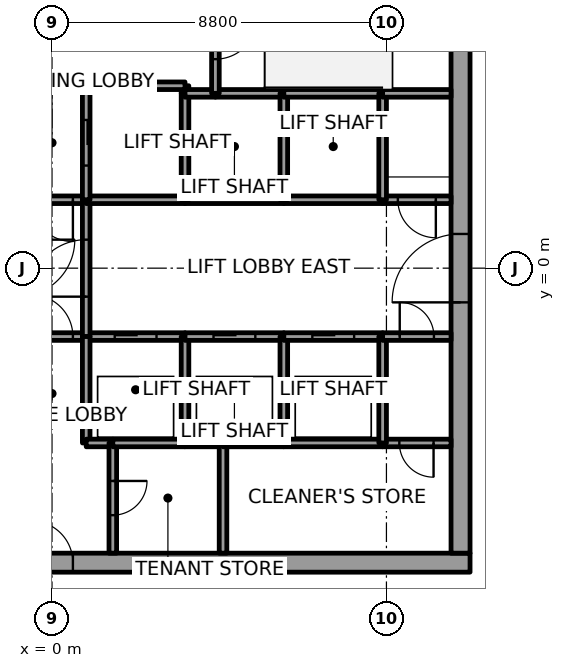
"""IFC4 building model, lengths in metres.
Left out: names, types, materials, properties, quantities, classifications, styles, units other than length and angle.
Written with IfcOpenShell. Run it as: python <this file> out.ifc"""

import sys

from ifc_helpers import new_model, si_unit, direction, frame, frame_2d, origin, place, context, subcontext, project, spatial, rectangle, extrude, element, fill, save


model = new_model("IFC4")
c1 = context("Model", 3, precision=1e-05, world=origin(), true_north=direction((0.0, 1.0)))
c2 = subcontext(c1, "Body", "Model", "MODEL_VIEW")
j1 = project(units=[si_unit("LENGTHUNIT", "METRE"), si_unit("PLANEANGLEUNIT", "RADIAN")], contexts=[c1])
p1 = place(None, origin())
s1 = spatial("IfcSite", under=j1, at=p1, CompositionType="ELEMENT")
p2 = place(p1, origin())
s2 = spatial("IfcBuilding", under=s1, at=p2, CompositionType="ELEMENT")
p3 = place(p2, frame((0.0, 0.0, 197.8)))
s3 = spatial("IfcBuildingStorey", under=s2, at=p3, CompositionType="ELEMENT", Elevation=197.8)
p4 = place(p3, frame((-11.0, -7.75, 0.0), z_axis=(0.0, 0.0, 1.0), x_axis=(1.0, 0.0, 0.0)))
e1 = element("IfcWall", 1, at=p4, inside=s3, PredefinedType="SHEAR", context=c2, shape_type="SweptSolid", body=[
    extrude(rectangle(XDim=22.0, YDim=0.5, at=frame_2d((11.0, 0.0))), origin(), (0.0, 0.0, 1.0), 4.0),
])
p5 = place(p4, frame((10.45, 0.0, 0.0)))
e2 = element("IfcOpeningElement", 2, at=p5, cuts=e1, PredefinedType="OPENING", context=c2, shape_type="SweptSolid", body=[
    extrude(rectangle(XDim=1.1, YDim=2.1, at=frame_2d((0.55, 1.05))), frame((0.0, 0.25, 0.0), z_axis=(0.0, -1.0, 0.0), x_axis=(1.0, 0.0, 0.0)), (0.0, 0.0, 1.0), 0.5),
])
p6 = place(p3, frame((10.75, -7.5, 0.0), z_axis=(0.0, 0.0, 1.0), x_axis=(0.0, 1.0, 0.0)))
e3 = element("IfcWall", 3, at=p6, inside=s3, PredefinedType="SHEAR", context=c2, shape_type="SweptSolid", body=[
    extrude(rectangle(XDim=15.0, YDim=0.5, at=frame_2d((7.5, 0.0))), origin(), (0.0, 0.0, 1.0), 4.0),
])
p7 = place(p6, frame((6.6, 0.0, 0.0)))
e4 = element("IfcOpeningElement", 4, at=p7, cuts=e3, PredefinedType="OPENING", context=c2, shape_type="SweptSolid", body=[
    extrude(rectangle(XDim=1.8, YDim=2.1, at=frame_2d((0.9, 1.05))), frame((0.0, 0.25, 0.0), z_axis=(0.0, -1.0, 0.0), x_axis=(1.0, 0.0, 0.0)), (0.0, 0.0, 1.0), 0.5),
])
p8 = place(p3, frame((-0.9, -1.8, 0.0), z_axis=(0.0, 0.0, 1.0), x_axis=(1.0, 0.0, 0.0)))
e5 = element("IfcWall", 5, at=p8, inside=s3, PredefinedType="SOLIDWALL", context=c2, shape_type="SweptSolid", body=[
    extrude(rectangle(XDim=1.8, YDim=0.2, at=frame_2d((0.9, 0.0))), origin(), (0.0, 0.0, 1.0), 3.85),
])
p9 = place(p8, frame((0.35, 0.0, 0.0)))
e6 = element("IfcOpeningElement", 6, at=p9, cuts=e5, PredefinedType="OPENING", context=c2, shape_type="SweptSolid", body=[
    extrude(rectangle(XDim=1.1, YDim=2.1, at=frame_2d((0.55, 1.05))), frame((0.0, 0.1, 0.0), z_axis=(0.0, -1.0, 0.0), x_axis=(1.0, 0.0, 0.0)), (0.0, 0.0, 1.0), 0.2),
])
p10 = place(p3, frame((0.9, 1.8, 0.0), z_axis=(0.0, 0.0, 1.0), x_axis=(-1.0, 0.0, 0.0)))
e7 = element("IfcWall", 7, at=p10, inside=s3, PredefinedType="SOLIDWALL", context=c2, shape_type="SweptSolid", body=[
    extrude(rectangle(XDim=1.8, YDim=0.2, at=frame_2d((0.9, 0.0))), origin(), (0.0, 0.0, 1.0), 3.85),
])
p11 = place(p10, frame((0.35, 0.0, 0.0)))
e8 = element("IfcOpeningElement", 8, at=p11, cuts=e7, PredefinedType="OPENING", context=c2, shape_type="SweptSolid", body=[
    extrude(rectangle(XDim=1.1, YDim=2.1, at=frame_2d((0.55, 1.05))), frame((0.0, 0.1, 0.0), z_axis=(0.0, -1.0, 0.0), x_axis=(1.0, 0.0, 0.0)), (0.0, 0.0, 1.0), 0.2),
])
p12 = place(p3, frame((0.9, -1.8, 0.0), z_axis=(0.0, 0.0, 1.0), x_axis=(1.0, 0.0, 0.0)))
e9 = element("IfcWall", 9, at=p12, inside=s3, PredefinedType="SOLIDWALL", context=c2, shape_type="SweptSolid", body=[
    extrude(rectangle(XDim=2.6, YDim=0.2, at=frame_2d((1.3, 0.0))), origin(), (0.0, 0.0, 1.0), 3.85),
])
p13 = place(p12, frame((0.75, 0.0, 0.0)))
e10 = element("IfcOpeningElement", 10, at=p13, cuts=e9, PredefinedType="OPENING", context=c2, shape_type="SweptSolid", body=[
    extrude(rectangle(XDim=1.1, YDim=2.1, at=frame_2d((0.55, 1.05))), frame((0.0, 0.1, 0.0), z_axis=(0.0, -1.0, 0.0), x_axis=(1.0, 0.0, 0.0)), (0.0, 0.0, 1.0), 0.2),
])
p14 = place(p3, frame((0.9, -1.8, 0.0), z_axis=(0.0, 0.0, 1.0), x_axis=(0.0, 1.0, 0.0)))
e11 = element("IfcWall", 11, at=p14, inside=s3, PredefinedType="SOLIDWALL", context=c2, shape_type="SweptSolid", body=[
    extrude(rectangle(XDim=3.6, YDim=0.2, at=frame_2d((1.8, 0.0))), origin(), (0.0, 0.0, 1.0), 3.85),
])
p15 = place(p14, frame((1.05, 0.0, 0.0)))
e12 = element("IfcOpeningElement", 12, at=p15, cuts=e11, PredefinedType="OPENING", context=c2, shape_type="SweptSolid", body=[
    extrude(rectangle(XDim=1.5, YDim=2.1, at=frame_2d((0.75, 1.05))), frame((0.0, 0.1, 0.0), z_axis=(0.0, -1.0, 0.0), x_axis=(1.0, 0.0, 0.0)), (0.0, 0.0, 1.0), 0.2),
])
p16 = place(p3, frame((0.9, -1.8, 0.0), z_axis=(0.0, 0.0, 1.0), x_axis=(0.0, -1.0, 0.0)))
e13 = element("IfcWall", 13, at=p16, inside=s3, PredefinedType="SOLIDWALL", context=c2, shape_type="SweptSolid", body=[
    extrude(rectangle(XDim=2.8, YDim=0.2, at=frame_2d((1.4, 0.0))), origin(), (0.0, 0.0, 1.0), 3.85),
])
p17 = place(p3, frame((0.9, -4.6, 0.0), z_axis=(0.0, 0.0, 1.0), x_axis=(1.0, 0.0, 0.0)))
e14 = element("IfcWall", 14, at=p17, inside=s3, PredefinedType="SOLIDWALL", context=c2, shape_type="SweptSolid", body=[
    extrude(rectangle(XDim=0.7, YDim=0.2, at=frame_2d((0.35, 0.0))), origin(), (0.0, 0.0, 1.0), 3.85),
])
p18 = place(p3, frame((3.5, 1.8, 0.0), z_axis=(0.0, 0.0, 1.0), x_axis=(-1.0, 0.0, 0.0)))
e15 = element("IfcWall", 15, at=p18, inside=s3, PredefinedType="SOLIDWALL", context=c2, shape_type="SweptSolid", body=[
    extrude(rectangle(XDim=2.6, YDim=0.2, at=frame_2d((1.3, 0.0))), origin(), (0.0, 0.0, 1.0), 3.85),
])
p19 = place(p3, frame((3.5, 4.6, 0.0), z_axis=(0.0, 0.0, 1.0), x_axis=(0.0, 1.0, 0.0)))
e16 = element("IfcWall", 16, at=p19, inside=s3, PredefinedType="SOLIDWALL", context=c2, shape_type="SweptSolid", body=[
    extrude(rectangle(XDim=0.2, YDim=0.2, at=frame_2d((0.1, 0.0))), origin(), (0.0, 0.0, 1.0), 3.85),
])
p20 = place(p3, frame((3.5, 4.8, 0.0), z_axis=(0.0, 0.0, 1.0), x_axis=(-1.0, 0.0, 0.0)))
e17 = element("IfcWall", 17, at=p20, inside=s3, PredefinedType="SOLIDWALL", context=c2, shape_type="SweptSolid", body=[
    extrude(rectangle(XDim=2.6, YDim=0.2, at=frame_2d((1.3, 0.0))), origin(), (0.0, 0.0, 1.0), 3.85),
])
p21 = place(p3, frame((0.9, 4.8, 0.0), z_axis=(0.0, 0.0, 1.0), x_axis=(0.0, -1.0, 0.0)))
e18 = element("IfcWall", 18, at=p21, inside=s3, PredefinedType="SOLIDWALL", context=c2, shape_type="SweptSolid", body=[
    extrude(rectangle(XDim=3.0, YDim=0.2, at=frame_2d((1.5, 0.0))), origin(), (0.0, 0.0, 1.0), 3.85),
])
p22 = place(p21, frame((0.9, 0.0, 0.0)))
e19 = element("IfcOpeningElement", 19, at=p22, cuts=e18, PredefinedType="OPENING", context=c2, shape_type="SweptSolid", body=[
    extrude(rectangle(XDim=1.2, YDim=2.1, at=frame_2d((0.6, 1.05))), frame((0.0, 0.1, 0.0), z_axis=(0.0, -1.0, 0.0), x_axis=(1.0, 0.0, 0.0)), (0.0, 0.0, 1.0), 0.2),
])
p23 = place(p3, frame((1.6, -4.6, 0.0), z_axis=(0.0, 0.0, 1.0), x_axis=(0.0, -1.0, 0.0)))
e20 = element("IfcWall", 20, at=p23, inside=s3, PredefinedType="SOLIDWALL", context=c2, shape_type="SweptSolid", body=[
    extrude(rectangle(XDim=2.9, YDim=0.2, at=frame_2d((1.45, 0.0))), origin(), (0.0, 0.0, 1.0), 3.85),
])
p24 = place(p23, frame((1.0, 0.0, 0.0)))
e21 = element("IfcOpeningElement", 21, at=p24, cuts=e20, PredefinedType="OPENING", context=c2, shape_type="SweptSolid", body=[
    extrude(rectangle(XDim=0.9, YDim=2.1, at=frame_2d((0.45, 1.05))), frame((0.0, 0.1, 0.0), z_axis=(0.0, -1.0, 0.0), x_axis=(1.0, 0.0, 0.0)), (0.0, 0.0, 1.0), 0.2),
])
p25 = place(p3, frame((3.5, -4.6, 0.0), z_axis=(0.0, 0.0, 1.0), x_axis=(-1.0, 0.0, 0.0)))
e22 = element("IfcWall", 22, at=p25, inside=s3, PredefinedType="SOLIDWALL", context=c2, shape_type="SweptSolid", body=[
    extrude(rectangle(XDim=1.9, YDim=0.2, at=frame_2d((0.95, 0.0))), origin(), (0.0, 0.0, 1.0), 3.85),
])
p26 = place(p3, frame((4.5, -4.6, 0.0), z_axis=(0.0, 0.0, 1.0), x_axis=(-1.0, 0.0, 0.0)))
e23 = element("IfcWall", 23, at=p26, inside=s3, PredefinedType="SOLIDWALL", context=c2, shape_type="SweptSolid", body=[
    extrude(rectangle(XDim=1.0, YDim=0.2, at=frame_2d((0.5, 0.0))), origin(), (0.0, 0.0, 1.0), 3.85),
])
p27 = place(p3, frame((3.5, -4.6, 0.0), z_axis=(0.0, 0.0, 1.0), x_axis=(0.0, 1.0, 0.0)))
e24 = element("IfcWall", 24, at=p27, inside=s3, PredefinedType="SOLIDWALL", context=c2, shape_type="SweptSolid", body=[
    extrude(rectangle(XDim=2.8, YDim=0.2, at=frame_2d((1.4, 0.0))), origin(), (0.0, 0.0, 1.0), 3.85),
])
p28 = place(p3, frame((3.5, -1.8, 0.0), z_axis=(0.0, 0.0, 1.0), x_axis=(1.0, 0.0, 0.0)))
e25 = element("IfcWall", 25, at=p28, inside=s3, PredefinedType="SOLIDWALL", context=c2, shape_type="SweptSolid", body=[
    extrude(rectangle(XDim=2.6, YDim=0.2, at=frame_2d((1.3, 0.0))), origin(), (0.0, 0.0, 1.0), 3.85),
])
p29 = place(p28, frame((0.75, 0.0, 0.0)))
e26 = element("IfcOpeningElement", 26, at=p29, cuts=e25, PredefinedType="OPENING", context=c2, shape_type="SweptSolid", body=[
    extrude(rectangle(XDim=1.1, YDim=2.1, at=frame_2d((0.55, 1.05))), frame((0.0, 0.1, 0.0), z_axis=(0.0, -1.0, 0.0), x_axis=(1.0, 0.0, 0.0)), (0.0, 0.0, 1.0), 0.2),
])
p30 = place(p3, frame((6.1, 1.8, 0.0), z_axis=(0.0, 0.0, 1.0), x_axis=(-1.0, 0.0, 0.0)))
e27 = element("IfcWall", 27, at=p30, inside=s3, PredefinedType="SOLIDWALL", context=c2, shape_type="SweptSolid", body=[
    extrude(rectangle(XDim=2.6, YDim=0.2, at=frame_2d((1.3, 0.0))), origin(), (0.0, 0.0, 1.0), 3.85),
])
p31 = place(p3, frame((3.5, 1.8, 0.0), z_axis=(0.0, 0.0, 1.0), x_axis=(0.0, 1.0, 0.0)))
e28 = element("IfcWall", 28, at=p31, inside=s3, PredefinedType="SOLIDWALL", context=c2, shape_type="SweptSolid", body=[
    extrude(rectangle(XDim=2.8, YDim=0.2, at=frame_2d((1.4, 0.0))), origin(), (0.0, 0.0, 1.0), 3.85),
])
p32 = place(p3, frame((4.3, 4.6, 0.0), z_axis=(0.0, 0.0, 1.0), x_axis=(-1.0, 0.0, 0.0)))
e29 = element("IfcWall", 29, at=p32, inside=s3, PredefinedType="SOLIDWALL", context=c2, shape_type="SweptSolid", body=[
    extrude(rectangle(XDim=0.8, YDim=0.2, at=frame_2d((0.4, 0.0))), origin(), (0.0, 0.0, 1.0), 3.85),
])
p33 = place(p3, frame((6.1, 4.6, 0.0), z_axis=(0.0, 0.0, 1.0), x_axis=(-1.0, 0.0, 0.0)))
e30 = element("IfcWall", 30, at=p33, inside=s3, PredefinedType="SOLIDWALL", context=c2, shape_type="SweptSolid", body=[
    extrude(rectangle(XDim=1.8, YDim=0.2, at=frame_2d((0.9, 0.0))), origin(), (0.0, 0.0, 1.0), 3.85),
])
p34 = place(p3, frame((4.3, 7.5, 0.0), z_axis=(0.0, 0.0, 1.0), x_axis=(0.0, -1.0, 0.0)))
e31 = element("IfcWall", 31, at=p34, inside=s3, PredefinedType="SOLIDWALL", context=c2, shape_type="SweptSolid", body=[
    extrude(rectangle(XDim=2.9, YDim=0.2, at=frame_2d((1.45, 0.0))), origin(), (0.0, 0.0, 1.0), 3.85),
])
p35 = place(p34, frame((0.9, 0.0, 0.0)))
e32 = element("IfcOpeningElement", 32, at=p35, cuts=e31, PredefinedType="OPENING", context=c2, shape_type="SweptSolid", body=[
    extrude(rectangle(XDim=1.1, YDim=2.1, at=frame_2d((0.55, 1.05))), frame((0.0, 0.1, 0.0), z_axis=(0.0, -1.0, 0.0), x_axis=(1.0, 0.0, 0.0)), (0.0, 0.0, 1.0), 0.2),
])
p36 = place(p3, frame((4.5, -4.6, 0.0), z_axis=(0.0, 0.0, 1.0), x_axis=(0.0, -1.0, 0.0)))
e33 = element("IfcWall", 33, at=p36, inside=s3, PredefinedType="SOLIDWALL", context=c2, shape_type="SweptSolid", body=[
    extrude(rectangle(XDim=2.9, YDim=0.2, at=frame_2d((1.45, 0.0))), origin(), (0.0, 0.0, 1.0), 3.85),
])
p37 = place(p3, frame((6.1, -4.6, 0.0), z_axis=(0.0, 0.0, 1.0), x_axis=(-1.0, 0.0, 0.0)))
e34 = element("IfcWall", 34, at=p37, inside=s3, PredefinedType="SOLIDWALL", context=c2, shape_type="SweptSolid", body=[
    extrude(rectangle(XDim=1.6, YDim=0.2, at=frame_2d((0.8, 0.0))), origin(), (0.0, 0.0, 1.0), 3.85),
])
p38 = place(p3, frame((8.7, -4.6, 0.0), z_axis=(0.0, 0.0, 1.0), x_axis=(-1.0, 0.0, 0.0)))
e35 = element("IfcWall", 35, at=p38, inside=s3, PredefinedType="SOLIDWALL", context=c2, shape_type="SweptSolid", body=[
    extrude(rectangle(XDim=2.6, YDim=0.2, at=frame_2d((1.3, 0.0))), origin(), (0.0, 0.0, 1.0), 3.85),
])
p39 = place(p3, frame((6.1, -4.6, 0.0), z_axis=(0.0, 0.0, 1.0), x_axis=(0.0, 1.0, 0.0)))
e36 = element("IfcWall", 36, at=p39, inside=s3, PredefinedType="SOLIDWALL", context=c2, shape_type="SweptSolid", body=[
    extrude(rectangle(XDim=2.8, YDim=0.2, at=frame_2d((1.4, 0.0))), origin(), (0.0, 0.0, 1.0), 3.85),
])
p40 = place(p3, frame((6.1, -1.8, 0.0), z_axis=(0.0, 0.0, 1.0), x_axis=(1.0, 0.0, 0.0)))
e37 = element("IfcWall", 37, at=p40, inside=s3, PredefinedType="SOLIDWALL", context=c2, shape_type="SweptSolid", body=[
    extrude(rectangle(XDim=2.6, YDim=0.2, at=frame_2d((1.3, 0.0))), origin(), (0.0, 0.0, 1.0), 3.85),
])
p41 = place(p40, frame((0.75, 0.0, 0.0)))
e38 = element("IfcOpeningElement", 38, at=p41, cuts=e37, PredefinedType="OPENING", context=c2, shape_type="SweptSolid", body=[
    extrude(rectangle(XDim=1.1, YDim=2.1, at=frame_2d((0.55, 1.05))), frame((0.0, 0.1, 0.0), z_axis=(0.0, -1.0, 0.0), x_axis=(1.0, 0.0, 0.0)), (0.0, 0.0, 1.0), 0.2),
])
p42 = place(p3, frame((8.7, 1.8, 0.0), z_axis=(0.0, 0.0, 1.0), x_axis=(-1.0, 0.0, 0.0)))
e39 = element("IfcWall", 39, at=p42, inside=s3, PredefinedType="SOLIDWALL", context=c2, shape_type="SweptSolid", body=[
    extrude(rectangle(XDim=2.6, YDim=0.2, at=frame_2d((1.3, 0.0))), origin(), (0.0, 0.0, 1.0), 3.85),
])
p43 = place(p3, frame((6.1, 1.8, 0.0), z_axis=(0.0, 0.0, 1.0), x_axis=(0.0, 1.0, 0.0)))
e40 = element("IfcWall", 40, at=p43, inside=s3, PredefinedType="SOLIDWALL", context=c2, shape_type="SweptSolid", body=[
    extrude(rectangle(XDim=2.8, YDim=0.2, at=frame_2d((1.4, 0.0))), origin(), (0.0, 0.0, 1.0), 3.85),
])
p44 = place(p3, frame((8.7, 4.6, 0.0), z_axis=(0.0, 0.0, 1.0), x_axis=(-1.0, 0.0, 0.0)))
e41 = element("IfcWall", 41, at=p44, inside=s3, PredefinedType="SOLIDWALL", context=c2, shape_type="SweptSolid", body=[
    extrude(rectangle(XDim=2.6, YDim=0.2, at=frame_2d((1.3, 0.0))), origin(), (0.0, 0.0, 1.0), 3.85),
])
p45 = place(p3, frame((10.5, -4.6, 0.0), z_axis=(0.0, 0.0, 1.0), x_axis=(-1.0, 0.0, 0.0)))
e42 = element("IfcWall", 42, at=p45, inside=s3, PredefinedType="SOLIDWALL", context=c2, shape_type="SweptSolid", body=[
    extrude(rectangle(XDim=1.8, YDim=0.2, at=frame_2d((0.9, 0.0))), origin(), (0.0, 0.0, 1.0), 3.85),
])
p46 = place(p45, frame((0.46, 0.0, 0.0)))
e43 = element("IfcOpeningElement", 43, at=p46, cuts=e42, PredefinedType="OPENING", context=c2, shape_type="SweptSolid", body=[
    extrude(rectangle(XDim=0.9, YDim=2.1, at=frame_2d((0.45, 1.05))), frame((0.0, 0.1, 0.0), z_axis=(0.0, -1.0, 0.0), x_axis=(1.0, 0.0, 0.0)), (0.0, 0.0, 1.0), 0.2),
])
p47 = place(p3, frame((8.7, -1.8, 0.0), z_axis=(0.0, 0.0, 1.0), x_axis=(0.0, -1.0, 0.0)))
e44 = element("IfcWall", 44, at=p47, inside=s3, PredefinedType="SOLIDWALL", context=c2, shape_type="SweptSolid", body=[
    extrude(rectangle(XDim=2.8, YDim=0.2, at=frame_2d((1.4, 0.0))), origin(), (0.0, 0.0, 1.0), 3.85),
])
p48 = place(p3, frame((8.7, -1.8, 0.0), z_axis=(0.0, 0.0, 1.0), x_axis=(1.0, 0.0, 0.0)))
e45 = element("IfcWall", 45, at=p48, inside=s3, PredefinedType="SOLIDWALL", context=c2, shape_type="SweptSolid", body=[
    extrude(rectangle(XDim=1.8, YDim=0.2, at=frame_2d((0.9, 0.0))), origin(), (0.0, 0.0, 1.0), 3.85),
])
p49 = place(p48, frame((0.45, 0.0, 0.0)))
e46 = element("IfcOpeningElement", 46, at=p49, cuts=e45, PredefinedType="OPENING", context=c2, shape_type="SweptSolid", body=[
    extrude(rectangle(XDim=0.9, YDim=2.1, at=frame_2d((0.45, 1.05))), frame((0.0, 0.1, 0.0), z_axis=(0.0, -1.0, 0.0), x_axis=(1.0, 0.0, 0.0)), (0.0, 0.0, 1.0), 0.2),
])
p50 = place(p3, frame((10.5, 1.8, 0.0), z_axis=(0.0, 0.0, 1.0), x_axis=(-1.0, 0.0, 0.0)))
e47 = element("IfcWall", 47, at=p50, inside=s3, PredefinedType="SOLIDWALL", context=c2, shape_type="SweptSolid", body=[
    extrude(rectangle(XDim=1.8, YDim=0.2, at=frame_2d((0.9, 0.0))), origin(), (0.0, 0.0, 1.0), 3.85),
])
p51 = place(p50, frame((0.4, 0.0, 0.0)))
e48 = element("IfcOpeningElement", 48, at=p51, cuts=e47, PredefinedType="OPENING", context=c2, shape_type="SweptSolid", body=[
    extrude(rectangle(XDim=1.0, YDim=2.1, at=frame_2d((0.5, 1.05))), frame((0.0, 0.1, 0.0), z_axis=(0.0, -1.0, 0.0), x_axis=(1.0, 0.0, 0.0)), (0.0, 0.0, 1.0), 0.2),
])
p52 = place(p3, frame((8.7, 4.6, 0.0), z_axis=(0.0, 0.0, 1.0), x_axis=(0.0, -1.0, 0.0)))
e49 = element("IfcWall", 49, at=p52, inside=s3, PredefinedType="SOLIDWALL", context=c2, shape_type="SweptSolid", body=[
    extrude(rectangle(XDim=2.8, YDim=0.2, at=frame_2d((1.4, 0.0))), origin(), (0.0, 0.0, 1.0), 3.85),
])
p53 = place(p3, frame((10.5, 4.6, 0.0), z_axis=(0.0, 0.0, 1.0), x_axis=(-1.0, 0.0, 0.0)))
e50 = element("IfcWall", 50, at=p53, inside=s3, PredefinedType="SOLIDWALL", context=c2, shape_type="SweptSolid", body=[
    extrude(rectangle(XDim=1.8, YDim=0.2, at=frame_2d((0.9, 0.0))), origin(), (0.0, 0.0, 1.0), 3.85),
])
p54 = place(p13, origin())
e51 = element("IfcDoor", 51, at=p54, inside=s3, OperationType="SLIDING_TO_LEFT", PredefinedType="DOOR", context=c2, shape_type="SweptSolid", body=[
    extrude(rectangle(XDim=1.1, YDim=2.1, at=frame_2d((0.55, 1.05))), frame((0.0, 0.025, 0.0), z_axis=(0.0, -1.0, 0.0), x_axis=(1.0, 0.0, 0.0)), (0.0, 0.0, 1.0), 0.05),
])
fill(e10, e51)
p55 = place(p29, origin())
e52 = element("IfcDoor", 52, at=p55, inside=s3, OperationType="SLIDING_TO_LEFT", PredefinedType="DOOR", context=c2, shape_type="SweptSolid", body=[
    extrude(rectangle(XDim=1.1, YDim=2.1, at=frame_2d((0.55, 1.05))), frame((0.0, 0.025, 0.0), z_axis=(0.0, -1.0, 0.0), x_axis=(1.0, 0.0, 0.0)), (0.0, 0.0, 1.0), 0.05),
])
fill(e26, e52)
p56 = place(p41, origin())
e53 = element("IfcDoor", 53, at=p56, inside=s3, OperationType="SLIDING_TO_LEFT", PredefinedType="DOOR", context=c2, shape_type="SweptSolid", body=[
    extrude(rectangle(XDim=1.1, YDim=2.1, at=frame_2d((0.55, 1.05))), frame((0.0, 0.025, 0.0), z_axis=(0.0, -1.0, 0.0), x_axis=(1.0, 0.0, 0.0)), (0.0, 0.0, 1.0), 0.05),
])
fill(e38, e53)
p57 = place(p22, origin())
e54 = element("IfcDoor", 54, at=p57, inside=s3, OperationType="SLIDING_TO_LEFT", PredefinedType="DOOR", context=c2, shape_type="SweptSolid", body=[
    extrude(rectangle(XDim=1.2, YDim=2.1, at=frame_2d((0.6, 1.05))), frame((0.0, 0.025, 0.0), z_axis=(0.0, -1.0, 0.0), x_axis=(1.0, 0.0, 0.0)), (0.0, 0.0, 1.0), 0.05),
])
fill(e19, e54)
p58 = place(p15, origin())
e55 = element("IfcDoor", 55, at=p58, inside=s3, OperationType="DOUBLE_DOOR_SINGLE_SWING", PredefinedType="DOOR", context=c2, shape_type="SweptSolid", body=[
    extrude(rectangle(XDim=1.5, YDim=2.1, at=frame_2d((0.75, 1.05))), frame((0.0, 0.025, 0.0), z_axis=(0.0, -1.0, 0.0), x_axis=(1.0, 0.0, 0.0)), (0.0, 0.0, 1.0), 0.05),
])
fill(e12, e55)
p59 = place(p11, origin())
e56 = element("IfcDoor", 56, at=p59, inside=s3, OperationType="SINGLE_SWING_LEFT", PredefinedType="DOOR", context=c2, shape_type="SweptSolid", body=[
    extrude(rectangle(XDim=1.1, YDim=2.1, at=frame_2d((0.55, 1.05))), frame((0.0, 0.025, 0.0), z_axis=(0.0, -1.0, 0.0), x_axis=(1.0, 0.0, 0.0)), (0.0, 0.0, 1.0), 0.05),
])
fill(e8, e56)
p60 = place(p9, origin())
e57 = element("IfcDoor", 57, at=p60, inside=s3, OperationType="SINGLE_SWING_RIGHT", PredefinedType="DOOR", context=c2, shape_type="SweptSolid", body=[
    extrude(rectangle(XDim=1.1, YDim=2.1, at=frame_2d((0.55, 1.05))), frame((0.0, 0.025, 0.0), z_axis=(0.0, -1.0, 0.0), x_axis=(1.0, 0.0, 0.0)), (0.0, 0.0, 1.0), 0.05),
])
fill(e6, e57)
p61 = place(p51, origin())
e58 = element("IfcDoor", 58, at=p61, inside=s3, OperationType="SINGLE_SWING_LEFT", PredefinedType="DOOR", context=c2, shape_type="SweptSolid", body=[
    extrude(rectangle(XDim=1.0, YDim=2.1, at=frame_2d((0.5, 1.05))), frame((0.0, 0.025, 0.0), z_axis=(0.0, -1.0, 0.0), x_axis=(1.0, 0.0, 0.0)), (0.0, 0.0, 1.0), 0.05),
])
fill(e48, e58)
p62 = place(p35, origin())
e59 = element("IfcDoor", 59, at=p62, inside=s3, OperationType="SINGLE_SWING_LEFT", PredefinedType="DOOR", context=c2, shape_type="SweptSolid", body=[
    extrude(rectangle(XDim=1.1, YDim=2.1, at=frame_2d((0.55, 1.05))), frame((0.0, 0.025, 0.0), z_axis=(0.0, -1.0, 0.0), x_axis=(1.0, 0.0, 0.0)), (0.0, 0.0, 1.0), 0.05),
])
fill(e32, e59)
p63 = place(p46, origin())
e60 = element("IfcDoor", 60, at=p63, inside=s3, OperationType="SINGLE_SWING_RIGHT", PredefinedType="DOOR", context=c2, shape_type="SweptSolid", body=[
    extrude(rectangle(XDim=0.9, YDim=2.1, at=frame_2d((0.45, 1.05))), frame((0.0, 0.025, 0.0), z_axis=(0.0, -1.0, 0.0), x_axis=(1.0, 0.0, 0.0)), (0.0, 0.0, 1.0), 0.05),
])
fill(e43, e60)
p64 = place(p49, origin())
e61 = element("IfcDoor", 61, at=p64, inside=s3, OperationType="SINGLE_SWING_RIGHT", PredefinedType="DOOR", context=c2, shape_type="SweptSolid", body=[
    extrude(rectangle(XDim=0.9, YDim=2.1, at=frame_2d((0.45, 1.05))), frame((0.0, 0.025, 0.0), z_axis=(0.0, -1.0, 0.0), x_axis=(1.0, 0.0, 0.0)), (0.0, 0.0, 1.0), 0.05),
])
fill(e46, e61)
p65 = place(p24, origin())
e62 = element("IfcDoor", 62, at=p65, inside=s3, OperationType="SINGLE_SWING_LEFT", PredefinedType="DOOR", context=c2, shape_type="SweptSolid", body=[
    extrude(rectangle(XDim=0.9, YDim=2.1, at=frame_2d((0.45, 1.05))), frame((0.0, 0.025, 0.0), z_axis=(0.0, -1.0, 0.0), x_axis=(1.0, 0.0, 0.0)), (0.0, 0.0, 1.0), 0.05),
])
fill(e21, e62)
p66 = place(p7, origin())
e63 = element("IfcDoor", 63, at=p66, inside=s3, OperationType="DOUBLE_DOOR_SINGLE_SWING", PredefinedType="DOOR", context=c2, shape_type="SweptSolid", body=[
    extrude(rectangle(XDim=1.8, YDim=2.1, at=frame_2d((0.9, 1.05))), frame((0.0, 0.025, 0.0), z_axis=(0.0, -1.0, 0.0), x_axis=(1.0, 0.0, 0.0)), (0.0, 0.0, 1.0), 0.05),
])
fill(e4, e63)
p67 = place(p5, origin())
e64 = element("IfcDoor", 64, at=p67, inside=s3, OperationType="SINGLE_SWING_RIGHT", PredefinedType="DOOR", context=c2, shape_type="SweptSolid", body=[
    extrude(rectangle(XDim=1.1, YDim=2.1, at=frame_2d((0.55, 1.05))), frame((0.0, 0.025, 0.0), z_axis=(0.0, -1.0, 0.0), x_axis=(1.0, 0.0, 0.0)), (0.0, 0.0, 1.0), 0.05),
])
fill(e2, e64)
save(model, sys.argv[1])
